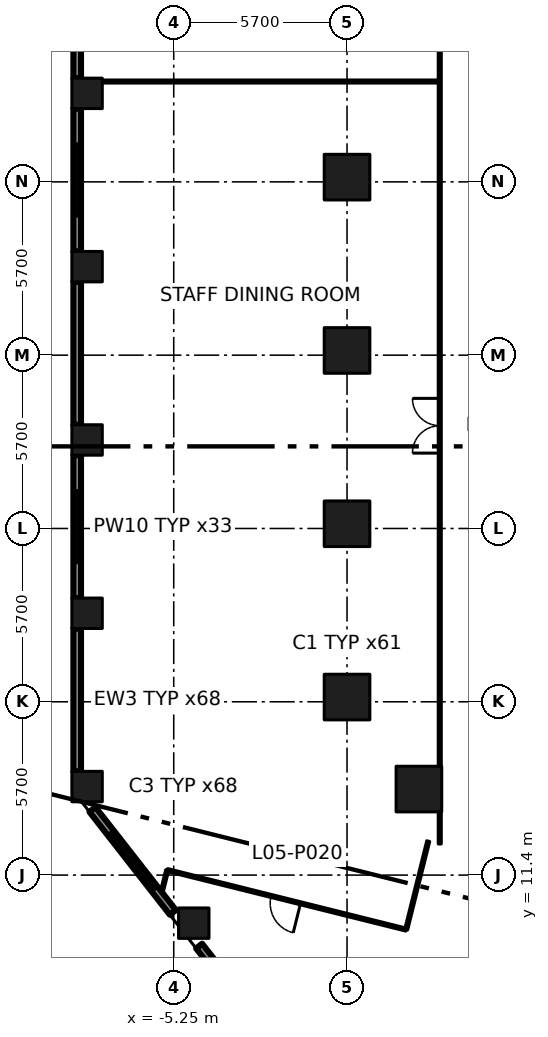
"""IFC4 building model, lengths in metres.
Left out: names, types, materials, properties, quantities, classifications, styles, units other than length and angle.
Written with IfcOpenShell. Run it as: python <this file> out.ifc"""

import sys

from ifc_helpers import new_model, si_unit, direction, frame, frame_2d, origin, origin_2d, place, context, subcontext, project, spatial, rectangle, extrude, element, fill, save


model = new_model("IFC4")
c1 = context("Model", 3, precision=1e-05, world=origin(), true_north=direction((0.0, 1.0)))
c2 = subcontext(c1, "Body", "Model", "MODEL_VIEW")
j1 = project(units=[si_unit("LENGTHUNIT", "METRE"), si_unit("PLANEANGLEUNIT", "RADIAN")], contexts=[c1])
p1 = place(None, origin())
s1 = spatial("IfcSite", under=j1, at=p1, CompositionType="ELEMENT")
p2 = place(p1, origin())
s2 = spatial("IfcBuilding", under=s1, at=p2, CompositionType="ELEMENT")
p3 = place(p2, frame((0.0, 0.0, 28.2)))
s3 = spatial("IfcBuildingStorey", under=s2, at=p3, CompositionType="ELEMENT", Elevation=28.2)
for number, where, z_axis, x_axis in (
    (1, (0.45, 17.255, 0.0), (0.0, 0.0, 1.0), (1.0, 0.0, 0.0)),
    (2, (0.45, 22.955, 0.0), (0.0, 0.0, 1.0), (1.0, 0.0, 0.0)),
    (3, (0.45, 28.655, 0.0), (0.0, 0.0, 1.0), (1.0, 0.0, 0.0)),
    (4, (0.45, 34.355, 0.0), (0.0, 0.0, 1.0), (1.0, 0.0, 0.0)),
    (5, (2.814, 14.229, 0.0), (0.0, 0.0, 1.0), (1.0, 0.0, 0.0)),
):
    element("IfcColumn", number, at=place(p3, frame(where, z_axis=z_axis, x_axis=x_axis)), inside=s3, PredefinedType="COLUMN", context=c2, shape_type="SweptSolid", body=[
        extrude(rectangle(XDim=1.5, YDim=1.5, at=origin_2d()), origin(), (0.0, 0.0, 1.0), 4.8),
    ])
for number, where, z_axis, x_axis in (
    (6, (-8.1, 14.311, 0.0), (0.0, 0.0, 1.0), (1.0, 0.0, 0.0)),
    (7, (-8.1, 20.011, 0.0), (0.0, 0.0, 1.0), (1.0, 0.0, 0.0)),
    (8, (-8.1, 25.711, 0.0), (0.0, 0.0, 1.0), (1.0, 0.0, 0.0)),
    (9, (-8.1, 31.411, 0.0), (0.0, 0.0, 1.0), (1.0, 0.0, 0.0)),
    (10, (-8.1, 37.111, 0.0), (0.0, 0.0, 1.0), (1.0, 0.0, 0.0)),
    (11, (-4.591, 9.819, 0.0), (0.0, 0.0, 1.0), (1.0, 0.0, 0.0)),
):
    element("IfcColumn", number, at=place(p3, frame(where, z_axis=z_axis, x_axis=x_axis)), inside=s3, PredefinedType="COLUMN", context=c2, shape_type="SweptSolid", body=[
        extrude(rectangle(XDim=1.0, YDim=1.0, at=origin_2d()), origin(), (0.0, 0.0, 1.0), 4.8),
    ])
p4 = place(p3, frame((-5.464, 11.565, 0.0), z_axis=(0.0, 0.0, 1.0), x_axis=(-0.24207252228, -0.970258158408, 0.0)))
e12 = element("IfcWall", 12, at=p4, inside=s3, PredefinedType="PARTITIONING", context=c2, shape_type="SweptSolid", body=[
    extrude(rectangle(XDim=0.744, YDim=0.1, at=frame_2d((0.372, 0.0))), origin(), (0.0, 0.0, 1.0), 4.35),
])
p5 = place(p3, frame((2.395, 9.606, 0.0), z_axis=(0.0, 0.0, 1.0), x_axis=(-0.97031070843, 0.241861797535, 0.0)))
e13 = element("IfcWall", 13, at=p5, inside=s3, PredefinedType="PARTITIONING", context=c2, shape_type="SweptSolid", body=[
    extrude(rectangle(XDim=8.1, YDim=0.1, at=frame_2d((4.05, 0.0))), origin(), (0.0, 0.0, 1.0), 4.35),
])
p6 = place(p5, frame((3.58, 0.0, 0.0)))
e14 = element("IfcOpeningElement", 14, at=p6, cuts=e13, PredefinedType="OPENING", context=c2, shape_type="SweptSolid", body=[
    extrude(rectangle(XDim=1.0, YDim=2.1, at=frame_2d((0.5, 1.05))), frame((0.0, 0.06, 0.0), z_axis=(0.0, -1.0, 0.0), x_axis=(1.0, 0.0, 0.0)), (0.0, 0.0, 1.0), 0.12),
])
p7 = place(p3, frame((3.121, 12.517, 0.0), z_axis=(0.0, 0.0, 1.0), x_axis=(-0.241999491975, -0.970276376031, 0.0)))
e15 = element("IfcWall", 15, at=p7, inside=s3, PredefinedType="PARTITIONING", context=c2, shape_type="SweptSolid", body=[
    extrude(rectangle(XDim=3.0, YDim=0.1, at=frame_2d((1.5, 0.0))), origin(), (0.0, 0.0, 1.0), 4.35),
])
p8 = place(p3, frame((3.5, 13.459, 0.0), z_axis=(0.0, 0.0, 1.0), x_axis=(0.0, -1.0, 0.0)))
e16 = element("IfcWall", 16, at=p8, inside=s3, PredefinedType="PARTITIONING", context=c2, shape_type="SweptSolid", body=[
    extrude(rectangle(XDim=1.036, YDim=0.1, at=frame_2d((0.518, 0.0))), origin(), (0.0, 0.0, 1.0), 4.35),
])
p9 = place(p3, frame((3.5, 14.999, 0.0), z_axis=(0.0, 0.0, 1.0), x_axis=(0.0, 1.0, 0.0)))
e17 = element("IfcWall", 17, at=p9, inside=s3, PredefinedType="PARTITIONING", context=c2, shape_type="SweptSolid", body=[
    extrude(rectangle(XDim=26.401, YDim=0.1, at=frame_2d((13.2, 0.0))), origin(), (0.0, 0.0, 1.0), 4.35),
])
p10 = place(p9, frame((10.28, 0.0, 0.0)))
e18 = element("IfcOpeningElement", 18, at=p10, cuts=e17, PredefinedType="OPENING", context=c2, shape_type="SweptSolid", body=[
    extrude(rectangle(XDim=1.8, YDim=2.1, at=frame_2d((0.9, 1.05))), frame((0.0, 0.06, 0.0), z_axis=(0.0, -1.0, 0.0), x_axis=(1.0, 0.0, 0.0)), (0.0, 0.0, 1.0), 0.12),
])
p11 = place(p9, frame((24.281, 0.0, 0.0)))
e19 = element("IfcOpeningElement", 19, at=p11, cuts=e17, PredefinedType="OPENING", context=c2, shape_type="SweptSolid", body=[
    extrude(rectangle(XDim=1.0, YDim=2.1, at=frame_2d((0.5, 1.05))), frame((0.0, 0.06, 0.0), z_axis=(0.0, -1.0, 0.0), x_axis=(1.0, 0.0, 0.0)), (0.0, 0.0, 1.0), 0.12),
])
p12 = place(p3, frame((3.45, 37.5, 0.0), z_axis=(0.0, 0.0, 1.0), x_axis=(-1.0, 0.0, 0.0)))
e20 = element("IfcWall", 20, at=p12, inside=s3, PredefinedType="PARTITIONING", context=c2, shape_type="SweptSolid", body=[
    extrude(rectangle(XDim=11.03, YDim=0.1, at=frame_2d((5.515, 0.0))), origin(), (0.0, 0.0, 1.0), 4.35),
])
p13 = place(p3, frame((-8.425, 42.311, 0.0), z_axis=(0.0, 0.0, 1.0), x_axis=(0.0, -1.0, 0.0)))
e21 = element("IfcWall", 21, at=p13, inside=s3, PredefinedType="SOLIDWALL", context=c2, shape_type="SweptSolid", body=[
    extrude(rectangle(XDim=4.7, YDim=0.25, at=frame_2d((2.35, 0.0))), origin(), (0.0, 0.0, 1.0), 3.45),
])
p14 = place(p3, frame((-8.425, 36.611, 0.0), z_axis=(0.0, 0.0, 1.0), x_axis=(0.0, -1.0, 0.0)))
e22 = element("IfcWall", 22, at=p14, inside=s3, PredefinedType="SOLIDWALL", context=c2, shape_type="SweptSolid", body=[
    extrude(rectangle(XDim=4.7, YDim=0.25, at=frame_2d((2.35, 0.0))), origin(), (0.0, 0.0, 1.0), 3.45),
])
p15 = place(p14, frame((1.15, 0.0, 0.9)))
e23 = element("IfcOpeningElement", 23, at=p15, cuts=e22, PredefinedType="OPENING", context=c2, shape_type="SweptSolid", body=[
    extrude(rectangle(XDim=2.4, YDim=2.1, at=frame_2d((1.2, 1.05))), frame((0.0, 0.135, 0.0), z_axis=(0.0, -1.0, 0.0), x_axis=(1.0, 0.0, 0.0)), (0.0, 0.0, 1.0), 0.27),
])
p16 = place(p3, frame((-8.425, 30.911, 0.0), z_axis=(0.0, 0.0, 1.0), x_axis=(0.0, -1.0, 0.0)))
e24 = element("IfcWall", 24, at=p16, inside=s3, PredefinedType="SOLIDWALL", context=c2, shape_type="SweptSolid", body=[
    extrude(rectangle(XDim=4.7, YDim=0.25, at=frame_2d((2.35, 0.0))), origin(), (0.0, 0.0, 1.0), 3.45),
])
p17 = place(p3, frame((-8.425, 25.211, 0.0), z_axis=(0.0, 0.0, 1.0), x_axis=(0.0, -1.0, 0.0)))
e25 = element("IfcWall", 25, at=p17, inside=s3, PredefinedType="SOLIDWALL", context=c2, shape_type="SweptSolid", body=[
    extrude(rectangle(XDim=4.7, YDim=0.25, at=frame_2d((2.35, 0.0))), origin(), (0.0, 0.0, 1.0), 3.45),
])
p18 = place(p17, frame((1.15, 0.0, 0.9)))
e26 = element("IfcOpeningElement", 26, at=p18, cuts=e25, PredefinedType="OPENING", context=c2, shape_type="SweptSolid", body=[
    extrude(rectangle(XDim=2.4, YDim=2.1, at=frame_2d((1.2, 1.05))), frame((0.0, 0.135, 0.0), z_axis=(0.0, -1.0, 0.0), x_axis=(1.0, 0.0, 0.0)), (0.0, 0.0, 1.0), 0.27),
])
p19 = place(p3, frame((-8.425, 19.511, 0.0), z_axis=(0.0, 0.0, 1.0), x_axis=(0.0, -1.0, 0.0)))
e27 = element("IfcWall", 27, at=p19, inside=s3, PredefinedType="SOLIDWALL", context=c2, shape_type="SweptSolid", body=[
    extrude(rectangle(XDim=4.7, YDim=0.25, at=frame_2d((2.35, 0.0))), origin(), (0.0, 0.0, 1.0), 3.45),
])
p20 = place(p3, frame((-7.924, 13.558, 0.0), z_axis=(0.0, 0.0, 1.0), x_axis=(0.615603242749, -0.788056246417, 0.0)))
e28 = element("IfcWall", 28, at=p20, inside=s3, PredefinedType="SOLIDWALL", context=c2, shape_type="SweptSolid", body=[
    extrude(rectangle(XDim=4.297, YDim=0.25, at=frame_2d((2.148, 0.0))), origin(), (0.0, 0.0, 1.0), 3.45),
])
p21 = place(p20, frame((0.948, 0.0, 0.9)))
e29 = element("IfcOpeningElement", 29, at=p21, cuts=e28, PredefinedType="OPENING", context=c2, shape_type="SweptSolid", body=[
    extrude(rectangle(XDim=2.4, YDim=2.1, at=frame_2d((1.2, 1.05))), frame((0.0, 0.135, 0.0), z_axis=(0.0, -1.0, 0.0), x_axis=(1.0, 0.0, 0.0)), (0.0, 0.0, 1.0), 0.27),
])
p22 = place(p3, frame((-4.415, 9.066, 0.0), z_axis=(0.0, 0.0, 1.0), x_axis=(0.615713519567, -0.787970089421, 0.0)))
e30 = element("IfcWall", 30, at=p22, inside=s3, PredefinedType="SOLIDWALL", context=c2, shape_type="SweptSolid", body=[
    extrude(rectangle(XDim=4.296, YDim=0.25, at=frame_2d((2.148, 0.0))), origin(), (0.0, 0.0, 1.0), 3.45),
])
p23 = place(p6, origin())
e31 = element("IfcDoor", 31, at=p23, inside=s3, OperationType="SINGLE_SWING_LEFT", PredefinedType="DOOR", context=c2, shape_type="SweptSolid", body=[
    extrude(rectangle(XDim=1.0, YDim=2.1, at=frame_2d((0.5, 1.05))), frame((0.0, 0.025, 0.0), z_axis=(0.0, -1.0, 0.0), x_axis=(1.0, 0.0, 0.0)), (0.0, 0.0, 1.0), 0.05),
])
fill(e14, e31)
p24 = place(p10, origin())
e32 = element("IfcDoor", 32, at=p24, inside=s3, OperationType="DOUBLE_DOOR_SINGLE_SWING", PredefinedType="DOOR", context=c2, shape_type="SweptSolid", body=[
    extrude(rectangle(XDim=1.8, YDim=2.1, at=frame_2d((0.9, 1.05))), frame((0.0, 0.025, 0.0), z_axis=(0.0, -1.0, 0.0), x_axis=(1.0, 0.0, 0.0)), (0.0, 0.0, 1.0), 0.05),
])
fill(e18, e32)
p25 = place(p15, origin())
e33 = element("IfcWindow", 33, at=p25, inside=s3, PartitioningType="DOUBLE_PANEL_VERTICAL", PredefinedType="WINDOW", context=c2, shape_type="SweptSolid", body=[
    extrude(rectangle(XDim=2.4, YDim=2.1, at=frame_2d((1.2, 1.05))), frame((0.0, 0.03, 0.0), z_axis=(0.0, -1.0, 0.0), x_axis=(1.0, 0.0, 0.0)), (0.0, 0.0, 1.0), 0.06),
])
fill(e23, e33)
p26 = place(p18, origin())
e34 = element("IfcWindow", 34, at=p26, inside=s3, PartitioningType="DOUBLE_PANEL_VERTICAL", PredefinedType="WINDOW", context=c2, shape_type="SweptSolid", body=[
    extrude(rectangle(XDim=2.4, YDim=2.1, at=frame_2d((1.2, 1.05))), frame((0.0, 0.03, 0.0), z_axis=(0.0, -1.0, 0.0), x_axis=(1.0, 0.0, 0.0)), (0.0, 0.0, 1.0), 0.06),
])
fill(e26, e34)
p27 = place(p21, origin())
e35 = element("IfcWindow", 35, at=p27, inside=s3, PartitioningType="DOUBLE_PANEL_VERTICAL", PredefinedType="WINDOW", context=c2, shape_type="SweptSolid", body=[
    extrude(rectangle(XDim=2.4, YDim=2.1, at=frame_2d((1.2, 1.05))), frame((0.0, 0.03, 0.0), z_axis=(0.0, -1.0, 0.0), x_axis=(1.0, 0.0, 0.0)), (0.0, 0.0, 1.0), 0.06),
])
fill(e29, e35)
save(model, sys.argv[1])
